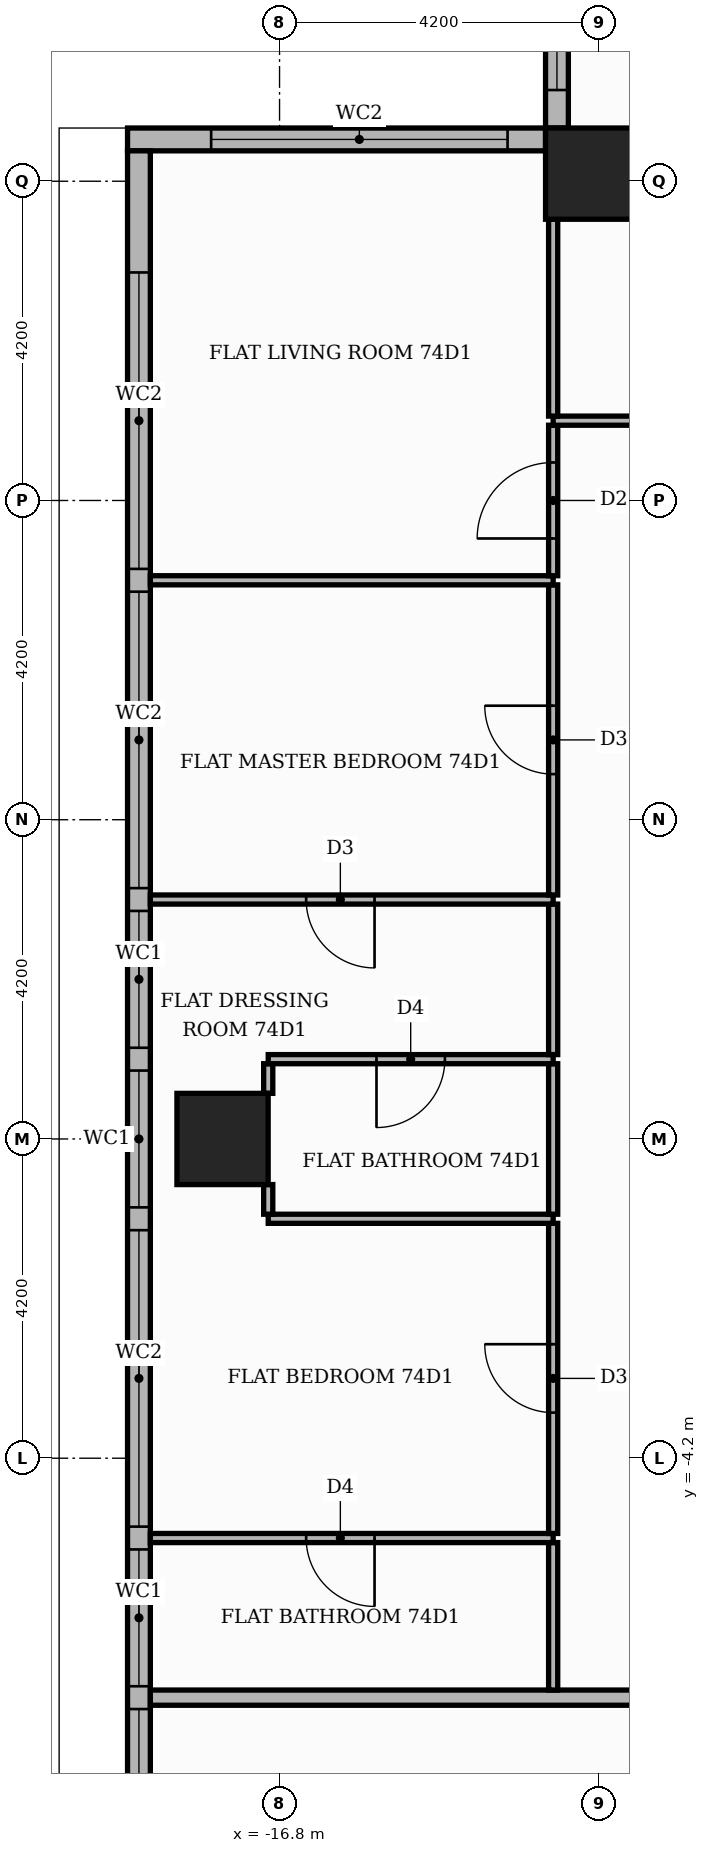
"""IFC4 building model, lengths in metres.
Left out: names, types, materials, properties, quantities, classifications, styles, units other than length and angle.
Written with IfcOpenShell. Run it as: python <this file> out.ifc"""

import sys

from ifc_helpers import new_model, si_unit, direction, frame, frame_2d, origin, origin_2d, place, context, subcontext, project, spatial, rectangle, extrude, element, fill, save


model = new_model("IFC4")
c1 = context("Model", 3, precision=1e-05, world=origin(), true_north=direction((0.0, 1.0)))
c2 = subcontext(c1, "Body", "Model", "MODEL_VIEW")
j1 = project(units=[si_unit("LENGTHUNIT", "METRE"), si_unit("PLANEANGLEUNIT", "RADIAN")], contexts=[c1])
p1 = place(None, origin())
s1 = spatial("IfcSite", under=j1, at=p1, CompositionType="ELEMENT")
p2 = place(p1, origin())
s2 = spatial("IfcBuilding", under=s1, at=p2, CompositionType="ELEMENT")
p3 = place(p2, frame((0.0, 0.0, 308.4)))
s3 = spatial("IfcBuildingStorey", under=s2, at=p3, CompositionType="ELEMENT", Elevation=308.4)
for number, where, z_axis, x_axis in (
    (1, (-17.55, 0.0, 0.0), (0.0, 0.0, 1.0), (1.0, 0.0, 0.0)),
    (2, (-12.7, 12.7, 0.0), (0.0, 0.0, 1.0), (1.0, 0.0, 0.0)),
):
    element("IfcColumn", number, at=place(p3, frame(where, z_axis=z_axis, x_axis=x_axis)), inside=s3, PredefinedType="COLUMN", context=c2, shape_type="SweptSolid", body=[
        extrude(rectangle(XDim=1.2, YDim=1.2, at=origin_2d()), origin(), (0.0, 0.0, 1.0), 3.9),
    ])
p4 = place(p3, frame((-13.15, 18.5, 0.0), z_axis=(0.0, 0.0, 1.0), x_axis=(0.0, -1.0, 0.0)))
e3 = element("IfcWall", 3, at=p4, inside=s3, PredefinedType="STANDARD", context=c2, shape_type="SweptSolid", body=[
    extrude(rectangle(XDim=5.2, YDim=0.3, at=frame_2d((2.6, 0.0))), origin(), (0.0, 0.0, 1.0), 3.55),
])
p5 = place(p4, frame((0.8, 0.0, 0.6)))
e4 = element("IfcOpeningElement", 4, at=p5, cuts=e3, PredefinedType="OPENING", context=c2, shape_type="SweptSolid", body=[
    extrude(rectangle(XDim=3.9, YDim=2.4, at=frame_2d((1.95, 1.2))), frame((0.0, 0.16, 0.0), z_axis=(0.0, -1.0, 0.0), x_axis=(1.0, 0.0, 0.0)), (0.0, 0.0, 1.0), 0.32),
])
p6 = place(p3, frame((-13.3, 13.15, 0.0), z_axis=(0.0, 0.0, 1.0), x_axis=(-1.0, 0.0, 0.0)))
e5 = element("IfcWall", 5, at=p6, inside=s3, PredefinedType="STANDARD", context=c2, shape_type="SweptSolid", body=[
    extrude(rectangle(XDim=5.5, YDim=0.3, at=frame_2d((2.75, 0.0))), origin(), (0.0, 0.0, 1.0), 3.55),
])
p7 = place(p6, frame((0.5, 0.0, 0.6)))
e6 = element("IfcOpeningElement", 6, at=p7, cuts=e5, PredefinedType="OPENING", context=c2, shape_type="SweptSolid", body=[
    extrude(rectangle(XDim=3.9, YDim=2.4, at=frame_2d((1.95, 1.2))), frame((0.0, 0.16, 0.0), z_axis=(0.0, -1.0, 0.0), x_axis=(1.0, 0.0, 0.0)), (0.0, 0.0, 1.0), 0.32),
])
p8 = place(p3, frame((-18.65, 13.0, 0.0), z_axis=(0.0, 0.0, 1.0), x_axis=(0.0, -1.0, 0.0)))
e7 = element("IfcWall", 7, at=p8, inside=s3, PredefinedType="STANDARD", context=c2, shape_type="SweptSolid", body=[
    extrude(rectangle(XDim=26.3, YDim=0.3, at=frame_2d((13.15, 0.0))), origin(), (0.0, 0.0, 1.0), 3.55),
])
p9 = place(p8, frame((1.6, 0.0, 0.6)))
e8 = element("IfcOpeningElement", 8, at=p9, cuts=e7, PredefinedType="OPENING", context=c2, shape_type="SweptSolid", body=[
    extrude(rectangle(XDim=3.9, YDim=2.4, at=frame_2d((1.95, 1.2))), frame((0.0, 0.16, 0.0), z_axis=(0.0, -1.0, 0.0), x_axis=(1.0, 0.0, 0.0)), (0.0, 0.0, 1.0), 0.32),
])
p10 = place(p8, frame((5.8, 0.0, 0.6)))
e9 = element("IfcOpeningElement", 9, at=p10, cuts=e7, PredefinedType="OPENING", context=c2, shape_type="SweptSolid", body=[
    extrude(rectangle(XDim=3.9, YDim=2.4, at=frame_2d((1.95, 1.2))), frame((0.0, 0.16, 0.0), z_axis=(0.0, -1.0, 0.0), x_axis=(1.0, 0.0, 0.0)), (0.0, 0.0, 1.0), 0.32),
])
p11 = place(p8, frame((10.0, 0.0, 0.6)))
e10 = element("IfcOpeningElement", 10, at=p11, cuts=e7, PredefinedType="OPENING", context=c2, shape_type="SweptSolid", body=[
    extrude(rectangle(XDim=1.8, YDim=2.4, at=frame_2d((0.9, 1.2))), frame((0.0, 0.16, 0.0), z_axis=(0.0, -1.0, 0.0), x_axis=(1.0, 0.0, 0.0)), (0.0, 0.0, 1.0), 0.32),
])
p12 = place(p8, frame((12.1, 0.0, 0.6)))
e11 = element("IfcOpeningElement", 11, at=p12, cuts=e7, PredefinedType="OPENING", context=c2, shape_type="SweptSolid", body=[
    extrude(rectangle(XDim=1.8, YDim=2.4, at=frame_2d((0.9, 1.2))), frame((0.0, 0.16, 0.0), z_axis=(0.0, -1.0, 0.0), x_axis=(1.0, 0.0, 0.0)), (0.0, 0.0, 1.0), 0.32),
])
p13 = place(p8, frame((14.2, 0.0, 0.6)))
e12 = element("IfcOpeningElement", 12, at=p13, cuts=e7, PredefinedType="OPENING", context=c2, shape_type="SweptSolid", body=[
    extrude(rectangle(XDim=3.9, YDim=2.4, at=frame_2d((1.95, 1.2))), frame((0.0, 0.16, 0.0), z_axis=(0.0, -1.0, 0.0), x_axis=(1.0, 0.0, 0.0)), (0.0, 0.0, 1.0), 0.32),
])
p14 = place(p8, frame((18.4, 0.0, 0.6)))
e13 = element("IfcOpeningElement", 13, at=p14, cuts=e7, PredefinedType="OPENING", context=c2, shape_type="SweptSolid", body=[
    extrude(rectangle(XDim=1.8, YDim=2.4, at=frame_2d((0.9, 1.2))), frame((0.0, 0.16, 0.0), z_axis=(0.0, -1.0, 0.0), x_axis=(1.0, 0.0, 0.0)), (0.0, 0.0, 1.0), 0.32),
])
p15 = place(p8, frame((20.5, 0.0, 0.6)))
e14 = element("IfcOpeningElement", 14, at=p15, cuts=e7, PredefinedType="OPENING", context=c2, shape_type="SweptSolid", body=[
    extrude(rectangle(XDim=3.9, YDim=2.4, at=frame_2d((1.95, 1.2))), frame((0.0, 0.16, 0.0), z_axis=(0.0, -1.0, 0.0), x_axis=(1.0, 0.0, 0.0)), (0.0, 0.0, 1.0), 0.32),
])
p16 = place(p3, frame((-18.5, -7.35, 0.0), z_axis=(0.0, 0.0, 1.0), x_axis=(1.0, 0.0, 0.0)))
e15 = element("IfcWall", 15, at=p16, inside=s3, PredefinedType="PARTITIONING", context=c2, shape_type="SweptSolid", body=[
    extrude(rectangle(XDim=25.85, YDim=0.2, at=frame_2d((12.925, 0.0))), origin(), (0.0, 0.0, 1.0), 3.55),
])
p17 = place(p16, frame((13.75, 0.0, 0.0)))
e16 = element("IfcOpeningElement", 16, at=p17, cuts=e15, PredefinedType="OPENING", context=c2, shape_type="SweptSolid", body=[
    extrude(rectangle(XDim=1.1, YDim=2.4, at=frame_2d((0.55, 1.2))), frame((0.0, 0.11, 0.0), z_axis=(0.0, -1.0, 0.0), x_axis=(1.0, 0.0, 0.0)), (0.0, 0.0, 1.0), 0.22),
])
p18 = place(p3, frame((-13.2, -7.25, 0.0), z_axis=(0.0, 0.0, 1.0), x_axis=(0.0, 1.0, 0.0)))
e17 = element("IfcWall", 17, at=p18, inside=s3, PredefinedType="PARTITIONING", context=c2, shape_type="SweptSolid", body=[
    extrude(rectangle(XDim=1.94, YDim=0.12, at=frame_2d((0.97, 0.0))), origin(), (0.0, 0.0, 1.0), 3.55),
])
p19 = place(p3, frame((-18.5, -5.25, 0.0), z_axis=(0.0, 0.0, 1.0), x_axis=(1.0, 0.0, 0.0)))
e18 = element("IfcWall", 18, at=p19, inside=s3, PredefinedType="PARTITIONING", context=c2, shape_type="SweptSolid", body=[
    extrude(rectangle(XDim=5.3, YDim=0.12, at=frame_2d((2.65, 0.0))), origin(), (0.0, 0.0, 1.0), 3.55),
])
p20 = place(p19, frame((2.05, 0.0, 0.0)))
e19 = element("IfcOpeningElement", 19, at=p20, cuts=e18, PredefinedType="OPENING", context=c2, shape_type="SweptSolid", body=[
    extrude(rectangle(XDim=0.9, YDim=2.1, at=frame_2d((0.45, 1.05))), frame((0.0, 0.07, 0.0), z_axis=(0.0, -1.0, 0.0), x_axis=(1.0, 0.0, 0.0)), (0.0, 0.0, 1.0), 0.14),
])
p21 = place(p3, frame((-13.2, -5.19, 0.0), z_axis=(0.0, 0.0, 1.0), x_axis=(0.0, 1.0, 0.0)))
e20 = element("IfcWall", 20, at=p21, inside=s3, PredefinedType="PARTITIONING", context=c2, shape_type="SweptSolid", body=[
    extrude(rectangle(XDim=4.08, YDim=0.12, at=frame_2d((2.04, 0.0))), origin(), (0.0, 0.0, 1.0), 3.55),
])
p22 = place(p21, frame((1.59, 0.0, 0.0)))
e21 = element("IfcOpeningElement", 21, at=p22, cuts=e20, PredefinedType="OPENING", context=c2, shape_type="SweptSolid", body=[
    extrude(rectangle(XDim=0.9, YDim=2.1, at=frame_2d((0.45, 1.05))), frame((0.0, 0.07, 0.0), z_axis=(0.0, -1.0, 0.0), x_axis=(1.0, 0.0, 0.0)), (0.0, 0.0, 1.0), 0.14),
])
p23 = place(p3, frame((-16.949, -1.05, 0.0), z_axis=(0.0, 0.0, 1.0), x_axis=(1.0, 0.0, 0.0)))
e22 = element("IfcWall", 22, at=p23, inside=s3, PredefinedType="PARTITIONING", context=c2, shape_type="SweptSolid", body=[
    extrude(rectangle(XDim=3.749, YDim=0.12, at=frame_2d((1.875, 0.0))), origin(), (0.0, 0.0, 1.0), 3.55),
])
p24 = place(p3, frame((-16.949, -0.99, 0.0), z_axis=(0.0, 0.0, 1.0), x_axis=(0.0, 1.0, 0.0)))
e23 = element("IfcWall", 23, at=p24, inside=s3, PredefinedType="PARTITIONING", context=c2, shape_type="SweptSolid", body=[
    extrude(rectangle(XDim=0.39, YDim=0.12, at=frame_2d((0.195, 0.0))), origin(), (0.0, 0.0, 1.0), 3.55),
])
p25 = place(p3, frame((-13.2, -0.99, 0.0), z_axis=(0.0, 0.0, 1.0), x_axis=(0.0, 1.0, 0.0)))
e24 = element("IfcWall", 24, at=p25, inside=s3, PredefinedType="PARTITIONING", context=c2, shape_type="SweptSolid", body=[
    extrude(rectangle(XDim=1.98, YDim=0.12, at=frame_2d((0.99, 0.0))), origin(), (0.0, 0.0, 1.0), 3.55),
])
p26 = place(p3, frame((-16.949, 0.6, 0.0), z_axis=(0.0, 0.0, 1.0), x_axis=(0.0, 1.0, 0.0)))
e25 = element("IfcWall", 25, at=p26, inside=s3, PredefinedType="PARTITIONING", context=c2, shape_type="SweptSolid", body=[
    extrude(rectangle(XDim=0.39, YDim=0.12, at=frame_2d((0.195, 0.0))), origin(), (0.0, 0.0, 1.0), 3.55),
])
p27 = place(p3, frame((-16.949, 1.05, 0.0), z_axis=(0.0, 0.0, 1.0), x_axis=(1.0, 0.0, 0.0)))
e26 = element("IfcWall", 26, at=p27, inside=s3, PredefinedType="PARTITIONING", context=c2, shape_type="SweptSolid", body=[
    extrude(rectangle(XDim=3.749, YDim=0.12, at=frame_2d((1.875, 0.0))), origin(), (0.0, 0.0, 1.0), 3.55),
])
p28 = place(p27, frame((1.425, 0.0, 0.0)))
e27 = element("IfcOpeningElement", 27, at=p28, cuts=e26, PredefinedType="OPENING", context=c2, shape_type="SweptSolid", body=[
    extrude(rectangle(XDim=0.9, YDim=2.1, at=frame_2d((0.45, 1.05))), frame((0.0, 0.07, 0.0), z_axis=(0.0, -1.0, 0.0), x_axis=(1.0, 0.0, 0.0)), (0.0, 0.0, 1.0), 0.14),
])
p29 = place(p3, frame((-13.2, 1.11, 0.0), z_axis=(0.0, 0.0, 1.0), x_axis=(0.0, 1.0, 0.0)))
e28 = element("IfcWall", 28, at=p29, inside=s3, PredefinedType="PARTITIONING", context=c2, shape_type="SweptSolid", body=[
    extrude(rectangle(XDim=1.98, YDim=0.12, at=frame_2d((0.99, 0.0))), origin(), (0.0, 0.0, 1.0), 3.55),
])
p30 = place(p3, frame((-18.5, 3.15, 0.0), z_axis=(0.0, 0.0, 1.0), x_axis=(1.0, 0.0, 0.0)))
e29 = element("IfcWall", 29, at=p30, inside=s3, PredefinedType="PARTITIONING", context=c2, shape_type="SweptSolid", body=[
    extrude(rectangle(XDim=5.3, YDim=0.12, at=frame_2d((2.65, 0.0))), origin(), (0.0, 0.0, 1.0), 3.55),
])
p31 = place(p30, frame((2.05, 0.0, 0.0)))
e30 = element("IfcOpeningElement", 30, at=p31, cuts=e29, PredefinedType="OPENING", context=c2, shape_type="SweptSolid", body=[
    extrude(rectangle(XDim=0.9, YDim=2.1, at=frame_2d((0.45, 1.05))), frame((0.0, 0.07, 0.0), z_axis=(0.0, -1.0, 0.0), x_axis=(1.0, 0.0, 0.0)), (0.0, 0.0, 1.0), 0.14),
])
p32 = place(p3, frame((-13.2, 3.21, 0.0), z_axis=(0.0, 0.0, 1.0), x_axis=(0.0, 1.0, 0.0)))
e31 = element("IfcWall", 31, at=p32, inside=s3, PredefinedType="PARTITIONING", context=c2, shape_type="SweptSolid", body=[
    extrude(rectangle(XDim=4.08, YDim=0.12, at=frame_2d((2.04, 0.0))), origin(), (0.0, 0.0, 1.0), 3.55),
])
p33 = place(p32, frame((1.59, 0.0, 0.0)))
e32 = element("IfcOpeningElement", 32, at=p33, cuts=e31, PredefinedType="OPENING", context=c2, shape_type="SweptSolid", body=[
    extrude(rectangle(XDim=0.9, YDim=2.1, at=frame_2d((0.45, 1.05))), frame((0.0, 0.07, 0.0), z_axis=(0.0, -1.0, 0.0), x_axis=(1.0, 0.0, 0.0)), (0.0, 0.0, 1.0), 0.14),
])
p34 = place(p3, frame((-18.5, 7.35, 0.0), z_axis=(0.0, 0.0, 1.0), x_axis=(1.0, 0.0, 0.0)))
e33 = element("IfcWall", 33, at=p34, inside=s3, PredefinedType="PARTITIONING", context=c2, shape_type="SweptSolid", body=[
    extrude(rectangle(XDim=5.3, YDim=0.12, at=frame_2d((2.65, 0.0))), origin(), (0.0, 0.0, 1.0), 3.55),
])
p35 = place(p3, frame((-13.2, 7.41, 0.0), z_axis=(0.0, 0.0, 1.0), x_axis=(0.0, 1.0, 0.0)))
e34 = element("IfcWall", 34, at=p35, inside=s3, PredefinedType="PARTITIONING", context=c2, shape_type="SweptSolid", body=[
    extrude(rectangle(XDim=1.98, YDim=0.12, at=frame_2d((0.99, 0.0))), origin(), (0.0, 0.0, 1.0), 3.55),
])
p36 = place(p35, frame((0.49, 0.0, 0.0)))
e35 = element("IfcOpeningElement", 35, at=p36, cuts=e34, PredefinedType="OPENING", context=c2, shape_type="SweptSolid", body=[
    extrude(rectangle(XDim=1.0, YDim=2.1, at=frame_2d((0.5, 1.05))), frame((0.0, 0.07, 0.0), z_axis=(0.0, -1.0, 0.0), x_axis=(1.0, 0.0, 0.0)), (0.0, 0.0, 1.0), 0.14),
])
p37 = place(p3, frame((-13.2, 9.45, 0.0), z_axis=(0.0, 0.0, 1.0), x_axis=(1.0, 0.0, 0.0)))
e36 = element("IfcWall", 36, at=p37, inside=s3, PredefinedType="PARTITIONING", context=c2, shape_type="SweptSolid", body=[
    extrude(rectangle(XDim=5.75, YDim=0.12, at=frame_2d((2.875, 0.0))), origin(), (0.0, 0.0, 1.0), 3.55),
])
p38 = place(p37, frame((2.425, 0.0, 0.0)))
e37 = element("IfcOpeningElement", 37, at=p38, cuts=e36, PredefinedType="OPENING", context=c2, shape_type="SweptSolid", body=[
    extrude(rectangle(XDim=1.0, YDim=2.1, at=frame_2d((0.5, 1.05))), frame((0.0, 0.07, 0.0), z_axis=(0.0, -1.0, 0.0), x_axis=(1.0, 0.0, 0.0)), (0.0, 0.0, 1.0), 0.14),
])
p39 = place(p3, frame((-13.2, 9.51, 0.0), z_axis=(0.0, 0.0, 1.0), x_axis=(0.0, 1.0, 0.0)))
e38 = element("IfcWall", 38, at=p39, inside=s3, PredefinedType="PARTITIONING", context=c2, shape_type="SweptSolid", body=[
    extrude(rectangle(XDim=2.59, YDim=0.12, at=frame_2d((1.295, 0.0))), origin(), (0.0, 0.0, 1.0), 3.55),
])
p40 = place(p5, origin())
e39 = element("IfcWindow", 39, at=p40, inside=s3, PartitioningType="SINGLE_PANEL", PredefinedType="WINDOW", context=c2, shape_type="SweptSolid", body=[
    extrude(rectangle(XDim=3.9, YDim=2.4, at=frame_2d((1.95, 1.2))), frame((0.0, 0.03, 0.0), z_axis=(0.0, -1.0, 0.0), x_axis=(1.0, 0.0, 0.0)), (0.0, 0.0, 1.0), 0.06),
])
fill(e4, e39)
p41 = place(p7, origin())
e40 = element("IfcWindow", 40, at=p41, inside=s3, PartitioningType="SINGLE_PANEL", PredefinedType="WINDOW", context=c2, shape_type="SweptSolid", body=[
    extrude(rectangle(XDim=3.9, YDim=2.4, at=frame_2d((1.95, 1.2))), frame((0.0, 0.03, 0.0), z_axis=(0.0, -1.0, 0.0), x_axis=(1.0, 0.0, 0.0)), (0.0, 0.0, 1.0), 0.06),
])
fill(e6, e40)
p42 = place(p9, origin())
e41 = element("IfcWindow", 41, at=p42, inside=s3, PartitioningType="SINGLE_PANEL", PredefinedType="WINDOW", context=c2, shape_type="SweptSolid", body=[
    extrude(rectangle(XDim=3.9, YDim=2.4, at=frame_2d((1.95, 1.2))), frame((0.0, 0.03, 0.0), z_axis=(0.0, -1.0, 0.0), x_axis=(1.0, 0.0, 0.0)), (0.0, 0.0, 1.0), 0.06),
])
fill(e8, e41)
p43 = place(p10, origin())
e42 = element("IfcWindow", 42, at=p43, inside=s3, PartitioningType="SINGLE_PANEL", PredefinedType="WINDOW", context=c2, shape_type="SweptSolid", body=[
    extrude(rectangle(XDim=3.9, YDim=2.4, at=frame_2d((1.95, 1.2))), frame((0.0, 0.03, 0.0), z_axis=(0.0, -1.0, 0.0), x_axis=(1.0, 0.0, 0.0)), (0.0, 0.0, 1.0), 0.06),
])
fill(e9, e42)
p44 = place(p11, origin())
e43 = element("IfcWindow", 43, at=p44, inside=s3, PartitioningType="SINGLE_PANEL", PredefinedType="WINDOW", context=c2, shape_type="SweptSolid", body=[
    extrude(rectangle(XDim=1.8, YDim=2.4, at=frame_2d((0.9, 1.2))), frame((0.0, 0.03, 0.0), z_axis=(0.0, -1.0, 0.0), x_axis=(1.0, 0.0, 0.0)), (0.0, 0.0, 1.0), 0.06),
])
fill(e10, e43)
p45 = place(p12, origin())
e44 = element("IfcWindow", 44, at=p45, inside=s3, PartitioningType="SINGLE_PANEL", PredefinedType="WINDOW", context=c2, shape_type="SweptSolid", body=[
    extrude(rectangle(XDim=1.8, YDim=2.4, at=frame_2d((0.9, 1.2))), frame((0.0, 0.03, 0.0), z_axis=(0.0, -1.0, 0.0), x_axis=(1.0, 0.0, 0.0)), (0.0, 0.0, 1.0), 0.06),
])
fill(e11, e44)
p46 = place(p13, origin())
e45 = element("IfcWindow", 45, at=p46, inside=s3, PartitioningType="SINGLE_PANEL", PredefinedType="WINDOW", context=c2, shape_type="SweptSolid", body=[
    extrude(rectangle(XDim=3.9, YDim=2.4, at=frame_2d((1.95, 1.2))), frame((0.0, 0.03, 0.0), z_axis=(0.0, -1.0, 0.0), x_axis=(1.0, 0.0, 0.0)), (0.0, 0.0, 1.0), 0.06),
])
fill(e12, e45)
p47 = place(p14, origin())
e46 = element("IfcWindow", 46, at=p47, inside=s3, PartitioningType="SINGLE_PANEL", PredefinedType="WINDOW", context=c2, shape_type="SweptSolid", body=[
    extrude(rectangle(XDim=1.8, YDim=2.4, at=frame_2d((0.9, 1.2))), frame((0.0, 0.03, 0.0), z_axis=(0.0, -1.0, 0.0), x_axis=(1.0, 0.0, 0.0)), (0.0, 0.0, 1.0), 0.06),
])
fill(e13, e46)
p48 = place(p15, origin())
e47 = element("IfcWindow", 47, at=p48, inside=s3, PartitioningType="SINGLE_PANEL", PredefinedType="WINDOW", context=c2, shape_type="SweptSolid", body=[
    extrude(rectangle(XDim=3.9, YDim=2.4, at=frame_2d((1.95, 1.2))), frame((0.0, 0.03, 0.0), z_axis=(0.0, -1.0, 0.0), x_axis=(1.0, 0.0, 0.0)), (0.0, 0.0, 1.0), 0.06),
])
fill(e14, e47)
p49 = place(p36, origin())
e48 = element("IfcDoor", 48, at=p49, inside=s3, OperationType="SINGLE_SWING_LEFT", PredefinedType="DOOR", context=c2, shape_type="SweptSolid", body=[
    extrude(rectangle(XDim=1.0, YDim=2.1, at=frame_2d((0.5, 1.05))), frame((0.0, 0.025, 0.0), z_axis=(0.0, -1.0, 0.0), x_axis=(1.0, 0.0, 0.0)), (0.0, 0.0, 1.0), 0.05),
])
fill(e35, e48)
p50 = place(p33, origin())
e49 = element("IfcDoor", 49, at=p50, inside=s3, OperationType="SINGLE_SWING_RIGHT", PredefinedType="DOOR", context=c2, shape_type="SweptSolid", body=[
    extrude(rectangle(XDim=0.9, YDim=2.1, at=frame_2d((0.45, 1.05))), frame((0.0, 0.025, 0.0), z_axis=(0.0, -1.0, 0.0), x_axis=(1.0, 0.0, 0.0)), (0.0, 0.0, 1.0), 0.05),
])
fill(e32, e49)
p51 = place(p31, frame((0.9, 0.0, 0.0), z_axis=(0.0, 0.0, 1.0), x_axis=(-1.0, 0.0, 0.0)))
e50 = element("IfcDoor", 50, at=p51, inside=s3, OperationType="SINGLE_SWING_RIGHT", PredefinedType="DOOR", context=c2, shape_type="SweptSolid", body=[
    extrude(rectangle(XDim=0.9, YDim=2.1, at=frame_2d((0.45, 1.05))), frame((0.0, 0.025, 0.0), z_axis=(0.0, -1.0, 0.0), x_axis=(1.0, 0.0, 0.0)), (0.0, 0.0, 1.0), 0.05),
])
fill(e30, e50)
p52 = place(p28, frame((0.9, 0.0, 0.0), z_axis=(0.0, 0.0, 1.0), x_axis=(-1.0, 0.0, 0.0)))
e51 = element("IfcDoor", 51, at=p52, inside=s3, OperationType="SINGLE_SWING_LEFT", PredefinedType="DOOR", context=c2, shape_type="SweptSolid", body=[
    extrude(rectangle(XDim=0.9, YDim=2.1, at=frame_2d((0.45, 1.05))), frame((0.0, 0.025, 0.0), z_axis=(0.0, -1.0, 0.0), x_axis=(1.0, 0.0, 0.0)), (0.0, 0.0, 1.0), 0.05),
])
fill(e27, e51)
p53 = place(p22, origin())
e52 = element("IfcDoor", 52, at=p53, inside=s3, OperationType="SINGLE_SWING_RIGHT", PredefinedType="DOOR", context=c2, shape_type="SweptSolid", body=[
    extrude(rectangle(XDim=0.9, YDim=2.1, at=frame_2d((0.45, 1.05))), frame((0.0, 0.025, 0.0), z_axis=(0.0, -1.0, 0.0), x_axis=(1.0, 0.0, 0.0)), (0.0, 0.0, 1.0), 0.05),
])
fill(e21, e52)
p54 = place(p20, frame((0.9, 0.0, 0.0), z_axis=(0.0, 0.0, 1.0), x_axis=(-1.0, 0.0, 0.0)))
e53 = element("IfcDoor", 53, at=p54, inside=s3, OperationType="SINGLE_SWING_RIGHT", PredefinedType="DOOR", context=c2, shape_type="SweptSolid", body=[
    extrude(rectangle(XDim=0.9, YDim=2.1, at=frame_2d((0.45, 1.05))), frame((0.0, 0.025, 0.0), z_axis=(0.0, -1.0, 0.0), x_axis=(1.0, 0.0, 0.0)), (0.0, 0.0, 1.0), 0.05),
])
fill(e19, e53)
save(model, sys.argv[1])
